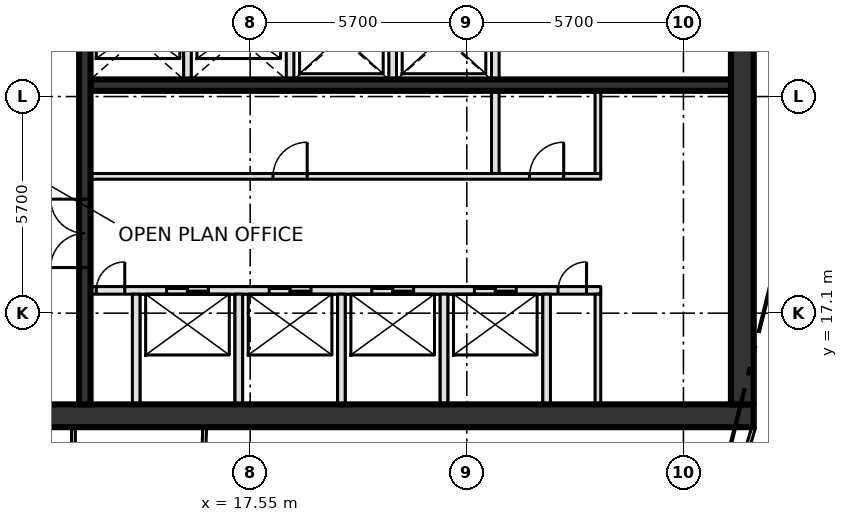
"""IFC4 building model, lengths in metres.
Left out: names, types, materials, properties, quantities, classifications, styles, units other than length and angle.
Written with IfcOpenShell. Run it as: python <this file> out.ifc"""

import sys

from ifc_helpers import new_model, si_unit, direction, frame, frame_2d, origin, place, context, subcontext, project, spatial, rectangle, extrude, element, fill, save


model = new_model("IFC4")
c1 = context("Model", 3, precision=1e-05, world=origin(), true_north=direction((0.0, 1.0)))
c2 = subcontext(c1, "Body", "Model", "MODEL_VIEW")
j1 = project(units=[si_unit("LENGTHUNIT", "METRE"), si_unit("PLANEANGLEUNIT", "RADIAN")], contexts=[c1])
p1 = place(None, origin())
s1 = spatial("IfcSite", under=j1, at=p1, CompositionType="ELEMENT")
p2 = place(p1, origin())
s2 = spatial("IfcBuilding", under=s1, at=p2, CompositionType="ELEMENT")
p3 = place(p2, frame((0.0, 0.0, 340.2)))
s3 = spatial("IfcBuildingStorey", under=s2, at=p3, CompositionType="ELEMENT", Elevation=340.2)
p4 = place(p3, frame((8.0, 14.4, -0.3), z_axis=(0.0, 0.0, 1.0), x_axis=(1.0, 0.0, 0.0)))
e1 = element("IfcWall", 1, at=p4, inside=s3, PredefinedType="SHEAR", context=c2, shape_type="SweptSolid", body=[
    extrude(rectangle(XDim=22.8, YDim=0.6, at=frame_2d((11.4, 0.0))), origin(), (0.0, 0.0, 1.0), 4.2),
])
p5 = place(p4, frame((2.3, 0.0, 0.3)))
e2 = element("IfcOpeningElement", 2, at=p5, cuts=e1, PredefinedType="OPENING", context=c2, shape_type="SweptSolid", body=[
    extrude(rectangle(XDim=1.8, YDim=2.1, at=frame_2d((0.9, 1.05))), frame((0.0, 0.31, 0.0), z_axis=(0.0, -1.0, 0.0), x_axis=(1.0, 0.0, 0.0)), (0.0, 0.0, 1.0), 0.62),
])
p6 = place(p3, frame((30.5, 14.7, -0.3), z_axis=(0.0, 0.0, 1.0), x_axis=(0.0, 1.0, 0.0)))
e3 = element("IfcWall", 3, at=p6, inside=s3, PredefinedType="SHEAR", context=c2, shape_type="SweptSolid", body=[
    extrude(rectangle(XDim=21.0, YDim=0.6, at=frame_2d((10.5, 0.0))), origin(), (0.0, 0.0, 1.0), 4.2),
])
p7 = place(p3, frame((13.35, 17.7, 0.0), z_axis=(0.0, 0.0, 1.0), x_axis=(1.0, 0.0, 0.0)))
e4 = element("IfcWall", 4, at=p7, inside=s3, PredefinedType="SOLIDWALL", context=c2, shape_type="SweptSolid", body=[
    extrude(rectangle(XDim=13.425, YDim=0.2, at=frame_2d((6.712, 0.0))), origin(), (0.0, 0.0, 1.0), 3.9),
])
p8 = place(p7, frame((2.0, 0.0, 0.0)))
e5 = element("IfcOpeningElement", 5, at=p8, cuts=e4, PredefinedType="OPENING", context=c2, shape_type="SweptSolid", body=[
    extrude(rectangle(XDim=1.1, YDim=2.1, at=frame_2d((0.55, 1.05))), frame((0.0, 0.11, 0.0), z_axis=(0.0, -1.0, 0.0), x_axis=(1.0, 0.0, 0.0)), (0.0, 0.0, 1.0), 0.22),
])
p9 = place(p7, frame((4.7, 0.0, 0.0)))
e6 = element("IfcOpeningElement", 6, at=p9, cuts=e4, PredefinedType="OPENING", context=c2, shape_type="SweptSolid", body=[
    extrude(rectangle(XDim=1.1, YDim=2.1, at=frame_2d((0.55, 1.05))), frame((0.0, 0.11, 0.0), z_axis=(0.0, -1.0, 0.0), x_axis=(1.0, 0.0, 0.0)), (0.0, 0.0, 1.0), 0.22),
])
p10 = place(p7, frame((7.4, 0.0, 0.0)))
e7 = element("IfcOpeningElement", 7, at=p10, cuts=e4, PredefinedType="OPENING", context=c2, shape_type="SweptSolid", body=[
    extrude(rectangle(XDim=1.1, YDim=2.1, at=frame_2d((0.55, 1.05))), frame((0.0, 0.11, 0.0), z_axis=(0.0, -1.0, 0.0), x_axis=(1.0, 0.0, 0.0)), (0.0, 0.0, 1.0), 0.22),
])
p11 = place(p7, frame((10.1, 0.0, 0.0)))
e8 = element("IfcOpeningElement", 8, at=p11, cuts=e4, PredefinedType="OPENING", context=c2, shape_type="SweptSolid", body=[
    extrude(rectangle(XDim=1.1, YDim=2.1, at=frame_2d((0.55, 1.05))), frame((0.0, 0.11, 0.0), z_axis=(0.0, -1.0, 0.0), x_axis=(1.0, 0.0, 0.0)), (0.0, 0.0, 1.0), 0.22),
])
p12 = place(p7, frame((0.15, 0.0, 0.0)))
e9 = element("IfcOpeningElement", 9, at=p12, cuts=e4, PredefinedType="OPENING", context=c2, shape_type="SweptSolid", body=[
    extrude(rectangle(XDim=0.75, YDim=2.1, at=frame_2d((0.375, 1.05))), frame((0.0, 0.11, 0.0), z_axis=(0.0, -1.0, 0.0), x_axis=(1.0, 0.0, 0.0)), (0.0, 0.0, 1.0), 0.22),
])
p13 = place(p7, frame((12.3, 0.0, 0.0)))
e10 = element("IfcOpeningElement", 10, at=p13, cuts=e4, PredefinedType="OPENING", context=c2, shape_type="SweptSolid", body=[
    extrude(rectangle(XDim=0.75, YDim=2.1, at=frame_2d((0.375, 1.05))), frame((0.0, 0.11, 0.0), z_axis=(0.0, -1.0, 0.0), x_axis=(1.0, 0.0, 0.0)), (0.0, 0.0, 1.0), 0.22),
])
p14 = place(p3, frame((13.35, 20.7, 0.0), z_axis=(0.0, 0.0, 1.0), x_axis=(1.0, 0.0, 0.0)))
e11 = element("IfcWall", 11, at=p14, inside=s3, PredefinedType="PARTITIONING", context=c2, shape_type="SweptSolid", body=[
    extrude(rectangle(XDim=13.425, YDim=0.15, at=frame_2d((6.712, 0.0))), origin(), (0.0, 0.0, 1.0), 3.9),
])
p15 = place(p14, frame((4.8, 0.0, 0.0)))
e12 = element("IfcOpeningElement", 12, at=p15, cuts=e11, PredefinedType="OPENING", context=c2, shape_type="SweptSolid", body=[
    extrude(rectangle(XDim=0.9, YDim=2.1, at=frame_2d((0.45, 1.05))), frame((0.0, 0.085, 0.0), z_axis=(0.0, -1.0, 0.0), x_axis=(1.0, 0.0, 0.0)), (0.0, 0.0, 1.0), 0.17),
])
p16 = place(p14, frame((11.55, 0.0, 0.0)))
e13 = element("IfcOpeningElement", 13, at=p16, cuts=e11, PredefinedType="OPENING", context=c2, shape_type="SweptSolid", body=[
    extrude(rectangle(XDim=0.9, YDim=2.1, at=frame_2d((0.45, 1.05))), frame((0.0, 0.085, 0.0), z_axis=(0.0, -1.0, 0.0), x_axis=(1.0, 0.0, 0.0)), (0.0, 0.0, 1.0), 0.17),
])
p17 = place(p3, frame((13.35, 23.1, 0.0), z_axis=(0.0, 0.0, 1.0), x_axis=(1.0, 0.0, 0.0)))
e14 = element("IfcWall", 14, at=p17, inside=s3, PredefinedType="SHEAR", context=c2, shape_type="SweptSolid", body=[
    extrude(rectangle(XDim=16.85, YDim=0.3, at=frame_2d((8.425, 0.0))), origin(), (0.0, 0.0, 1.0), 3.9),
])
p18 = place(p3, frame((13.2, 14.7, 0.0), z_axis=(0.0, 0.0, 1.0), x_axis=(0.0, 1.0, 0.0)))
e15 = element("IfcWall", 15, at=p18, inside=s3, PredefinedType="SHEAR", context=c2, shape_type="SweptSolid", body=[
    extrude(rectangle(XDim=21.0, YDim=0.3, at=frame_2d((10.5, 0.0))), origin(), (0.0, 0.0, 1.0), 3.9),
])
p19 = place(p18, frame((3.6, 0.0, 0.0)))
e16 = element("IfcOpeningElement", 16, at=p19, cuts=e15, PredefinedType="OPENING", context=c2, shape_type="SweptSolid", body=[
    extrude(rectangle(XDim=1.8, YDim=2.1, at=frame_2d((0.9, 1.05))), frame((0.0, 0.16, 0.0), z_axis=(0.0, -1.0, 0.0), x_axis=(1.0, 0.0, 0.0)), (0.0, 0.0, 1.0), 0.32),
])
p20 = place(p18, frame((11.7, 0.0, 0.0)))
e17 = element("IfcOpeningElement", 17, at=p20, cuts=e15, PredefinedType="OPENING", context=c2, shape_type="SweptSolid", body=[
    extrude(rectangle(XDim=1.2, YDim=2.1, at=frame_2d((0.6, 1.05))), frame((0.0, 0.16, 0.0), z_axis=(0.0, -1.0, 0.0), x_axis=(1.0, 0.0, 0.0)), (0.0, 0.0, 1.0), 0.32),
])
p21 = place(p3, frame((14.55, 14.7, 0.0), z_axis=(0.0, 0.0, 1.0), x_axis=(0.0, 1.0, 0.0)))
e18 = element("IfcWall", 18, at=p21, inside=s3, PredefinedType="SOLIDWALL", context=c2, shape_type="SweptSolid", body=[
    extrude(rectangle(XDim=2.9, YDim=0.2, at=frame_2d((1.45, 0.0))), origin(), (0.0, 0.0, 1.0), 3.9),
])
p22 = place(p3, frame((15.9, 23.25, 0.0), z_axis=(0.0, 0.0, 1.0), x_axis=(0.0, 1.0, 0.0)))
e19 = element("IfcWall", 19, at=p22, inside=s3, PredefinedType="SOLIDWALL", context=c2, shape_type="SweptSolid", body=[
    extrude(rectangle(XDim=2.15, YDim=0.2, at=frame_2d((1.075, 0.0))), origin(), (0.0, 0.0, 1.0), 3.9),
])
p23 = place(p3, frame((17.25, 14.7, 0.0), z_axis=(0.0, 0.0, 1.0), x_axis=(0.0, 1.0, 0.0)))
e20 = element("IfcWall", 20, at=p23, inside=s3, PredefinedType="SOLIDWALL", context=c2, shape_type="SweptSolid", body=[
    extrude(rectangle(XDim=2.9, YDim=0.2, at=frame_2d((1.45, 0.0))), origin(), (0.0, 0.0, 1.0), 3.9),
])
p24 = place(p3, frame((18.6, 23.25, 0.0), z_axis=(0.0, 0.0, 1.0), x_axis=(0.0, 1.0, 0.0)))
e21 = element("IfcWall", 21, at=p24, inside=s3, PredefinedType="SOLIDWALL", context=c2, shape_type="SweptSolid", body=[
    extrude(rectangle(XDim=5.15, YDim=0.2, at=frame_2d((2.575, 0.0))), origin(), (0.0, 0.0, 1.0), 3.9),
])
p25 = place(p24, frame((3.15, 0.0, 0.0)))
e22 = element("IfcOpeningElement", 22, at=p25, cuts=e21, PredefinedType="OPENING", context=c2, shape_type="SweptSolid", body=[
    extrude(rectangle(XDim=1.2, YDim=2.1, at=frame_2d((0.6, 1.05))), frame((0.0, 0.11, 0.0), z_axis=(0.0, -1.0, 0.0), x_axis=(1.0, 0.0, 0.0)), (0.0, 0.0, 1.0), 0.22),
])
p26 = place(p3, frame((19.95, 14.7, 0.0), z_axis=(0.0, 0.0, 1.0), x_axis=(0.0, 1.0, 0.0)))
e23 = element("IfcWall", 23, at=p26, inside=s3, PredefinedType="SOLIDWALL", context=c2, shape_type="SweptSolid", body=[
    extrude(rectangle(XDim=2.9, YDim=0.2, at=frame_2d((1.45, 0.0))), origin(), (0.0, 0.0, 1.0), 3.9),
])
p27 = place(p3, frame((21.3, 23.25, 0.0), z_axis=(0.0, 0.0, 1.0), x_axis=(0.0, 1.0, 0.0)))
e24 = element("IfcWall", 24, at=p27, inside=s3, PredefinedType="SOLIDWALL", context=c2, shape_type="SweptSolid", body=[
    extrude(rectangle(XDim=2.15, YDim=0.2, at=frame_2d((1.075, 0.0))), origin(), (0.0, 0.0, 1.0), 3.9),
])
p28 = place(p3, frame((22.65, 14.7, 0.0), z_axis=(0.0, 0.0, 1.0), x_axis=(0.0, 1.0, 0.0)))
e25 = element("IfcWall", 25, at=p28, inside=s3, PredefinedType="SOLIDWALL", context=c2, shape_type="SweptSolid", body=[
    extrude(rectangle(XDim=2.9, YDim=0.2, at=frame_2d((1.45, 0.0))), origin(), (0.0, 0.0, 1.0), 3.9),
])
p29 = place(p3, frame((24.0, 20.775, 0.0), z_axis=(0.0, 0.0, 1.0), x_axis=(0.0, 1.0, 0.0)))
e26 = element("IfcWall", 26, at=p29, inside=s3, PredefinedType="SOLIDWALL", context=c2, shape_type="SweptSolid", body=[
    extrude(rectangle(XDim=4.625, YDim=0.2, at=frame_2d((2.312, 0.0))), origin(), (0.0, 0.0, 1.0), 3.9),
])
p30 = place(p3, frame((25.35, 14.7, 0.0), z_axis=(0.0, 0.0, 1.0), x_axis=(0.0, 1.0, 0.0)))
e27 = element("IfcWall", 27, at=p30, inside=s3, PredefinedType="SOLIDWALL", context=c2, shape_type="SweptSolid", body=[
    extrude(rectangle(XDim=2.9, YDim=0.2, at=frame_2d((1.45, 0.0))), origin(), (0.0, 0.0, 1.0), 3.9),
])
p31 = place(p3, frame((26.7, 14.7, 0.0), z_axis=(0.0, 0.0, 1.0), x_axis=(0.0, 1.0, 0.0)))
e28 = element("IfcWall", 28, at=p31, inside=s3, PredefinedType="PARTITIONING", context=c2, shape_type="SweptSolid", body=[
    extrude(rectangle(XDim=2.9, YDim=0.15, at=frame_2d((1.45, 0.0))), origin(), (0.0, 0.0, 1.0), 3.9),
])
p32 = place(p3, frame((26.7, 20.775, 0.0), z_axis=(0.0, 0.0, 1.0), x_axis=(0.0, 1.0, 0.0)))
e29 = element("IfcWall", 29, at=p32, inside=s3, PredefinedType="PARTITIONING", context=c2, shape_type="SweptSolid", body=[
    extrude(rectangle(XDim=2.175, YDim=0.15, at=frame_2d((1.087, 0.0))), origin(), (0.0, 0.0, 1.0), 3.9),
])
p33 = place(p3, frame((12.9, 10.078, 0.0), z_axis=(0.0, 0.0, 1.0), x_axis=(0.0, 1.0, 0.0)))
e30 = element("IfcWall", 30, at=p33, inside=s3, PredefinedType="PARTITIONING", context=c2, shape_type="SweptSolid", body=[
    extrude(rectangle(XDim=4.022, YDim=0.1, at=frame_2d((2.011, 0.0))), origin(), (0.0, 0.0, 1.0), 3.9),
])
p34 = place(p33, frame((1.48, 0.0, 0.0)))
e31 = element("IfcOpeningElement", 31, at=p34, cuts=e30, PredefinedType="OPENING", context=c2, shape_type="SweptSolid", body=[
    extrude(rectangle(XDim=1.0, YDim=2.1, at=frame_2d((0.5, 1.05))), frame((0.0, 0.06, 0.0), z_axis=(0.0, -1.0, 0.0), x_axis=(1.0, 0.0, 0.0)), (0.0, 0.0, 1.0), 0.12),
])
p35 = place(p3, frame((30.8, 14.1, 0.0), z_axis=(0.0, 0.0, 1.0), x_axis=(-0.28588265334, -0.958264633867, 0.0)))
e32 = element("IfcWall", 32, at=p35, inside=s3, PredefinedType="PARTITIONING", context=c2, shape_type="SweptSolid", body=[
    extrude(rectangle(XDim=8.776, YDim=0.1, at=frame_2d((4.388, 0.0))), origin(), (0.0, 0.0, 1.0), 3.9),
])
p36 = place(p3, frame((16.167, 8.775, 0.0), z_axis=(0.0, 0.0, 1.0), x_axis=(0.034913599617, 0.999390334435, 0.0)))
e33 = element("IfcWall", 33, at=p36, inside=s3, PredefinedType="PARTITIONING", context=c2, shape_type="SweptSolid", body=[
    extrude(rectangle(XDim=5.328, YDim=0.1, at=frame_2d((2.664, 0.0))), origin(), (0.0, 0.0, 1.0), 3.9),
])
p37 = place(p8, origin())
e34 = element("IfcDoor", 34, at=p37, inside=s3, OperationType="SLIDING_TO_LEFT", PredefinedType="DOOR", context=c2, shape_type="SweptSolid", body=[
    extrude(rectangle(XDim=1.1, YDim=2.1, at=frame_2d((0.55, 1.05))), frame((0.0, 0.025, 0.0), z_axis=(0.0, -1.0, 0.0), x_axis=(1.0, 0.0, 0.0)), (0.0, 0.0, 1.0), 0.05),
])
fill(e5, e34)
p38 = place(p9, origin())
e35 = element("IfcDoor", 35, at=p38, inside=s3, OperationType="SLIDING_TO_LEFT", PredefinedType="DOOR", context=c2, shape_type="SweptSolid", body=[
    extrude(rectangle(XDim=1.1, YDim=2.1, at=frame_2d((0.55, 1.05))), frame((0.0, 0.025, 0.0), z_axis=(0.0, -1.0, 0.0), x_axis=(1.0, 0.0, 0.0)), (0.0, 0.0, 1.0), 0.05),
])
fill(e6, e35)
p39 = place(p10, origin())
e36 = element("IfcDoor", 36, at=p39, inside=s3, OperationType="SLIDING_TO_LEFT", PredefinedType="DOOR", context=c2, shape_type="SweptSolid", body=[
    extrude(rectangle(XDim=1.1, YDim=2.1, at=frame_2d((0.55, 1.05))), frame((0.0, 0.025, 0.0), z_axis=(0.0, -1.0, 0.0), x_axis=(1.0, 0.0, 0.0)), (0.0, 0.0, 1.0), 0.05),
])
fill(e7, e36)
p40 = place(p11, origin())
e37 = element("IfcDoor", 37, at=p40, inside=s3, OperationType="SLIDING_TO_LEFT", PredefinedType="DOOR", context=c2, shape_type="SweptSolid", body=[
    extrude(rectangle(XDim=1.1, YDim=2.1, at=frame_2d((0.55, 1.05))), frame((0.0, 0.025, 0.0), z_axis=(0.0, -1.0, 0.0), x_axis=(1.0, 0.0, 0.0)), (0.0, 0.0, 1.0), 0.05),
])
fill(e8, e37)
p41 = place(p12, origin())
e38 = element("IfcDoor", 38, at=p41, inside=s3, OperationType="SINGLE_SWING_RIGHT", PredefinedType="DOOR", context=c2, shape_type="SweptSolid", body=[
    extrude(rectangle(XDim=0.75, YDim=2.1, at=frame_2d((0.375, 1.05))), frame((0.0, 0.025, 0.0), z_axis=(0.0, -1.0, 0.0), x_axis=(1.0, 0.0, 0.0)), (0.0, 0.0, 1.0), 0.05),
])
fill(e9, e38)
p42 = place(p13, origin())
e39 = element("IfcDoor", 39, at=p42, inside=s3, OperationType="SINGLE_SWING_RIGHT", PredefinedType="DOOR", context=c2, shape_type="SweptSolid", body=[
    extrude(rectangle(XDim=0.75, YDim=2.1, at=frame_2d((0.375, 1.05))), frame((0.0, 0.025, 0.0), z_axis=(0.0, -1.0, 0.0), x_axis=(1.0, 0.0, 0.0)), (0.0, 0.0, 1.0), 0.05),
])
fill(e10, e39)
p43 = place(p15, origin())
e40 = element("IfcDoor", 40, at=p43, inside=s3, OperationType="SINGLE_SWING_RIGHT", PredefinedType="DOOR", context=c2, shape_type="SweptSolid", body=[
    extrude(rectangle(XDim=0.9, YDim=2.1, at=frame_2d((0.45, 1.05))), frame((0.0, 0.025, 0.0), z_axis=(0.0, -1.0, 0.0), x_axis=(1.0, 0.0, 0.0)), (0.0, 0.0, 1.0), 0.05),
])
fill(e12, e40)
p44 = place(p16, origin())
e41 = element("IfcDoor", 41, at=p44, inside=s3, OperationType="SINGLE_SWING_RIGHT", PredefinedType="DOOR", context=c2, shape_type="SweptSolid", body=[
    extrude(rectangle(XDim=0.9, YDim=2.1, at=frame_2d((0.45, 1.05))), frame((0.0, 0.025, 0.0), z_axis=(0.0, -1.0, 0.0), x_axis=(1.0, 0.0, 0.0)), (0.0, 0.0, 1.0), 0.05),
])
fill(e13, e41)
p45 = place(p19, origin())
e42 = element("IfcDoor", 42, at=p45, inside=s3, OperationType="DOUBLE_DOOR_SINGLE_SWING", PredefinedType="DOOR", context=c2, shape_type="SweptSolid", body=[
    extrude(rectangle(XDim=1.8, YDim=2.1, at=frame_2d((0.9, 1.05))), frame((0.0, 0.025, 0.0), z_axis=(0.0, -1.0, 0.0), x_axis=(1.0, 0.0, 0.0)), (0.0, 0.0, 1.0), 0.05),
])
fill(e16, e42)
save(model, sys.argv[1])
